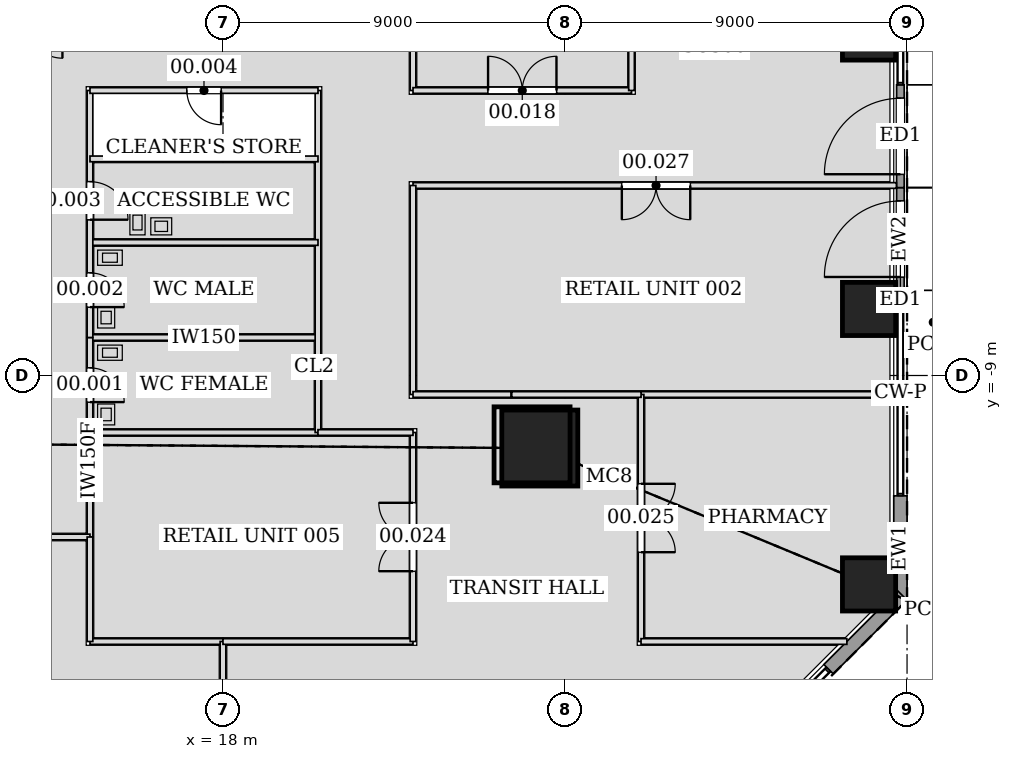
"""IFC4 building model, lengths in metres.
Left out: names, types, materials, properties, quantities, classifications, styles, units other than length and angle.
Written with IfcOpenShell. Run it as: python <this file> out.ifc"""

import sys

from ifc_helpers import new_model, si_unit, direction, frame, frame_2d, origin, origin_2d, place, context, subcontext, project, spatial, rectangle, hollow_rectangle, extrude, element, fill, save


model = new_model("IFC4")
c1 = context("Model", 3, precision=1e-05, world=origin(), true_north=direction((0.0, 1.0)))
c2 = subcontext(c1, "Body", "Model", "MODEL_VIEW")
j1 = project(units=[si_unit("LENGTHUNIT", "METRE"), si_unit("PLANEANGLEUNIT", "RADIAN")], contexts=[c1])
p1 = place(None, origin())
s1 = spatial("IfcSite", under=j1, at=p1, CompositionType="ELEMENT")
p2 = place(p1, origin())
s2 = spatial("IfcBuilding", under=s1, at=p2, CompositionType="ELEMENT")
p3 = place(p2, origin())
s3 = spatial("IfcBuildingStorey", under=s2, at=p3, CompositionType="ELEMENT", Elevation=0.0)
p4 = place(p3, frame((26.336, -10.909, 0.0), z_axis=(-0.028266568786, 0.011726897842, 0.999531630793), x_axis=(-0.383199413132, -0.923665637433, 0.0)))
e1 = element("IfcColumn", 1, at=p4, inside=s3, PredefinedType="COLUMN", context=c2, shape_type="SweptSolid", body=[
    extrude(hollow_rectangle(XDim=2.0, YDim=2.0, WallThickness=0.09, at=origin_2d()), origin(), (0.0, 0.0, 1.0), 7.203),
])
for number, where, z_axis, x_axis in (
    (2, (35.0, -14.498, 0.0), (0.0, 0.0, 1.0), (1.0, 0.0, 0.0)),
    (3, (35.0, -7.249, 0.0), (0.0, 0.0, 1.0), (1.0, 0.0, 0.0)),
    (4, (35.0, 0.0, 0.0), (0.0, 0.0, 1.0), (1.0, 0.0, 0.0)),
):
    element("IfcColumn", number, at=place(p3, frame(where, z_axis=z_axis, x_axis=x_axis)), inside=s3, PredefinedType="COLUMN", context=c2, shape_type="SweptSolid", body=[
        extrude(rectangle(XDim=1.4, YDim=1.4, at=origin_2d()), origin(), (0.0, 0.0, 1.0), 7.2),
    ])
p5 = place(p3, frame((35.825, -14.912, 0.0), z_axis=(0.0, 0.0, 1.0), x_axis=(0.0, 1.0, 0.0)))
e5 = element("IfcWall", 5, at=p5, inside=s3, PredefinedType="SOLIDWALL", context=c2, shape_type="SweptSolid", body=[
    extrude(rectangle(XDim=2.745, YDim=0.35, at=frame_2d((1.373, 0.0))), origin(), (0.0, 0.0, 1.0), 6.9),
])
p6 = place(p3, frame((35.825, -6.759, 0.0), z_axis=(0.0, 0.0, 1.0), x_axis=(0.0, 1.0, 0.0)))
e6 = element("IfcWall", 6, at=p6, inside=s3, PredefinedType="SOLIDWALL", context=c2, shape_type="SweptSolid", body=[
    extrude(rectangle(XDim=2.704, YDim=0.2, at=frame_2d((1.352, 0.0))), origin(), (0.0, 0.0, 1.0), 6.9),
])
p7 = place(p6, frame((0.352, 0.0, 0.0)))
e7 = element("IfcOpeningElement", 7, at=p7, cuts=e6, PredefinedType="OPENING", context=c2, shape_type="SweptSolid", body=[
    extrude(rectangle(XDim=2.0, YDim=3.0, at=frame_2d((1.0, 1.5))), frame((0.0, 0.11, 0.0), z_axis=(0.0, -1.0, 0.0), x_axis=(1.0, 0.0, 0.0)), (0.0, 0.0, 1.0), 0.22),
])
p8 = place(p3, frame((35.825, -4.055, 0.0), z_axis=(0.0, 0.0, 1.0), x_axis=(0.0, 1.0, 0.0)))
e8 = element("IfcWall", 8, at=p8, inside=s3, PredefinedType="SOLIDWALL", context=c2, shape_type="SweptSolid", body=[
    extrude(rectangle(XDim=2.704, YDim=0.2, at=frame_2d((1.352, 0.0))), origin(), (0.0, 0.0, 1.0), 6.9),
])
p9 = place(p8, frame((0.352, 0.0, 0.0)))
e9 = element("IfcOpeningElement", 9, at=p9, cuts=e8, PredefinedType="OPENING", context=c2, shape_type="SweptSolid", body=[
    extrude(rectangle(XDim=2.0, YDim=3.0, at=frame_2d((1.0, 1.5))), frame((0.0, 0.11, 0.0), z_axis=(0.0, -1.0, 0.0), x_axis=(1.0, 0.0, 0.0)), (0.0, 0.0, 1.0), 0.22),
])
p10 = place(p3, frame((33.935, -16.729, 0.0), z_axis=(0.0, 0.0, 1.0), x_axis=(0.707106781187, 0.707106781187, 0.0)))
e10 = element("IfcWall", 10, at=p10, inside=s3, PredefinedType="SOLIDWALL", context=c2, shape_type="SweptSolid", body=[
    extrude(rectangle(XDim=2.745, YDim=0.35, at=frame_2d((1.373, 0.0))), origin(), (0.0, 0.0, 1.0), 6.9),
])
p11 = place(p3, frame((20.5, -8.0, 0.0), z_axis=(0.0, 0.0, 1.0), x_axis=(-1.0, 0.0, 0.0)))
e11 = element("IfcWall", 11, at=p11, inside=s3, PredefinedType="PARTITIONING", context=c2, shape_type="SweptSolid", body=[
    extrude(rectangle(XDim=6.0, YDim=0.15, at=frame_2d((3.0, 0.0))), origin(), (0.0, 0.0, 1.0), 6.283),
])
p12 = place(p3, frame((14.5, -10.5, 0.0), z_axis=(0.0, 0.0, 1.0), x_axis=(1.0, 0.0, 0.0)))
e12 = element("IfcWall", 12, at=p12, inside=s3, PredefinedType="PARTITIONING", context=c2, shape_type="SweptSolid", body=[
    extrude(rectangle(XDim=6.0, YDim=0.15, at=frame_2d((3.0, 0.0))), origin(), (0.0, 0.0, 1.0), 5.59),
])
p13 = place(p3, frame((14.5, -8.0, 0.0), z_axis=(0.0, 0.0, 1.0), x_axis=(0.0, -1.0, 0.0)))
e13 = element("IfcWall", 13, at=p13, inside=s3, PredefinedType="PARTITIONING", context=c2, shape_type="SweptSolid", body=[
    extrude(rectangle(XDim=5.251, YDim=0.15, at=frame_2d((2.625, 0.0))), origin(), (0.0, 0.0, 1.0), 5.59),
])
p14 = place(p13, frame((0.8, 0.0, 0.0)))
e14 = element("IfcOpeningElement", 14, at=p14, cuts=e13, PredefinedType="OPENING", context=c2, shape_type="SweptSolid", body=[
    extrude(rectangle(XDim=0.9, YDim=2.1, at=frame_2d((0.45, 1.05))), frame((0.0, 0.085, 0.0), z_axis=(0.0, -1.0, 0.0), x_axis=(1.0, 0.0, 0.0)), (0.0, 0.0, 1.0), 0.17),
])
p15 = place(p3, frame((20.5, -10.5, 0.0), z_axis=(0.0, 0.0, 1.0), x_axis=(0.0, 1.0, 0.0)))
e15 = element("IfcWall", 15, at=p15, inside=s3, PredefinedType="PARTITIONING", context=c2, shape_type="SweptSolid", body=[
    extrude(rectangle(XDim=9.0, YDim=0.15, at=frame_2d((4.5, 0.0))), origin(), (0.0, 0.0, 1.0), 6.9),
])
p16 = place(p3, frame((20.5, -5.5, 0.0), z_axis=(0.0, 0.0, 1.0), x_axis=(-1.0, 0.0, 0.0)))
e16 = element("IfcWall", 16, at=p16, inside=s3, PredefinedType="PARTITIONING", context=c2, shape_type="SweptSolid", body=[
    extrude(rectangle(XDim=6.0, YDim=0.15, at=frame_2d((3.0, 0.0))), origin(), (0.0, 0.0, 1.0), 6.283),
])
p17 = place(p3, frame((14.5, -8.0, 0.0), z_axis=(0.0, 0.0, 1.0), x_axis=(0.0, 1.0, 0.0)))
e17 = element("IfcWall", 17, at=p17, inside=s3, PredefinedType="PARTITIONING", context=c2, shape_type="SweptSolid", body=[
    extrude(rectangle(XDim=6.5, YDim=0.15, at=frame_2d((3.25, 0.0))), origin(), (0.0, 0.0, 1.0), 6.9),
])
p18 = place(p17, frame((0.8, 0.0, 0.0)))
e18 = element("IfcOpeningElement", 18, at=p18, cuts=e17, PredefinedType="OPENING", context=c2, shape_type="SweptSolid", body=[
    extrude(rectangle(XDim=0.9, YDim=2.1, at=frame_2d((0.45, 1.05))), frame((0.0, 0.085, 0.0), z_axis=(0.0, -1.0, 0.0), x_axis=(1.0, 0.0, 0.0)), (0.0, 0.0, 1.0), 0.17),
])
p19 = place(p17, frame((3.1, 0.0, 0.0)))
e19 = element("IfcOpeningElement", 19, at=p19, cuts=e17, PredefinedType="OPENING", context=c2, shape_type="SweptSolid", body=[
    extrude(rectangle(XDim=1.0, YDim=2.1, at=frame_2d((0.5, 1.05))), frame((0.0, 0.085, 0.0), z_axis=(0.0, -1.0, 0.0), x_axis=(1.0, 0.0, 0.0)), (0.0, 0.0, 1.0), 0.17),
])
p20 = place(p3, frame((20.5, -3.3, 0.0), z_axis=(0.0, 0.0, 1.0), x_axis=(-1.0, 0.0, 0.0)))
e20 = element("IfcWall", 20, at=p20, inside=s3, PredefinedType="PARTITIONING", context=c2, shape_type="SweptSolid", body=[
    extrude(rectangle(XDim=6.0, YDim=0.15, at=frame_2d((3.0, 0.0))), origin(), (0.0, 0.0, 1.0), 6.283),
])
p21 = place(p3, frame((20.5, -1.5, 0.0), z_axis=(0.0, 0.0, 1.0), x_axis=(-1.0, 0.0, 0.0)))
e21 = element("IfcWall", 21, at=p21, inside=s3, PredefinedType="PARTITIONING", context=c2, shape_type="SweptSolid", body=[
    extrude(rectangle(XDim=6.0, YDim=0.15, at=frame_2d((3.0, 0.0))), origin(), (0.0, 0.0, 1.0), 6.283),
])
p22 = place(p21, frame((2.55, 0.0, 0.0)))
e22 = element("IfcOpeningElement", 22, at=p22, cuts=e21, PredefinedType="OPENING", context=c2, shape_type="SweptSolid", body=[
    extrude(rectangle(XDim=0.9, YDim=2.1, at=frame_2d((0.45, 1.05))), frame((0.0, 0.085, 0.0), z_axis=(0.0, -1.0, 0.0), x_axis=(1.0, 0.0, 0.0)), (0.0, 0.0, 1.0), 0.17),
])
p23 = place(p3, frame((23.0, 0.25, 0.0), z_axis=(0.0, 0.0, 1.0), x_axis=(0.0, -1.0, 0.0)))
e23 = element("IfcWall", 23, at=p23, inside=s3, PredefinedType="PARTITIONING", context=c2, shape_type="SweptSolid", body=[
    extrude(rectangle(XDim=1.75, YDim=0.15, at=frame_2d((0.875, 0.0))), origin(), (0.0, 0.0, 1.0), 5.59),
])
p24 = place(p3, frame((23.0, -1.5, 0.0), z_axis=(0.0, 0.0, 1.0), x_axis=(1.0, 0.0, 0.0)))
e24 = element("IfcWall", 24, at=p24, inside=s3, PredefinedType="PARTITIONING", context=c2, shape_type="SweptSolid", body=[
    extrude(rectangle(XDim=5.75, YDim=0.15, at=frame_2d((2.875, 0.0))), origin(), (0.0, 0.0, 1.0), 5.879),
])
p25 = place(p24, frame((1.975, 0.0, 0.0)))
e25 = element("IfcOpeningElement", 25, at=p25, cuts=e24, PredefinedType="OPENING", context=c2, shape_type="SweptSolid", body=[
    extrude(rectangle(XDim=1.8, YDim=2.4, at=frame_2d((0.9, 1.2))), frame((0.0, 0.085, 0.0), z_axis=(0.0, -1.0, 0.0), x_axis=(1.0, 0.0, 0.0)), (0.0, 0.0, 1.0), 0.17),
])
p26 = place(p3, frame((28.75, -1.5, 0.0), z_axis=(0.0, 0.0, 1.0), x_axis=(0.0, 1.0, 0.0)))
e26 = element("IfcWall", 26, at=p26, inside=s3, PredefinedType="PARTITIONING", context=c2, shape_type="SweptSolid", body=[
    extrude(rectangle(XDim=1.601, YDim=0.15, at=frame_2d((0.8, 0.0))), origin(), (0.0, 0.0, 1.0), 6.9),
])
p27 = place(p3, frame((0.25, -13.25, 0.0), z_axis=(0.0, 0.0, 1.0), x_axis=(1.0, 0.0, 0.0)))
e27 = element("IfcWall", 27, at=p27, inside=s3, PredefinedType="PARTITIONING", context=c2, shape_type="SweptSolid", body=[
    extrude(rectangle(XDim=14.25, YDim=0.15, at=frame_2d((7.125, 0.0))), origin(), (0.0, 0.0, 1.0), 5.59),
])
p28 = place(p27, frame((3.45, 0.0, 0.0)))
e28 = element("IfcOpeningElement", 28, at=p28, cuts=e27, PredefinedType="OPENING", context=c2, shape_type="SweptSolid", body=[
    extrude(rectangle(XDim=1.8, YDim=2.4, at=frame_2d((0.9, 1.2))), frame((0.0, 0.085, 0.0), z_axis=(0.0, -1.0, 0.0), x_axis=(1.0, 0.0, 0.0)), (0.0, 0.0, 1.0), 0.17),
])
p29 = place(p3, frame((18.0, -16.0, 0.0), z_axis=(0.0, 0.0, 1.0), x_axis=(-1.0, 0.0, 0.0)))
e29 = element("IfcWall", 29, at=p29, inside=s3, PredefinedType="PARTITIONING", context=c2, shape_type="SweptSolid", body=[
    extrude(rectangle(XDim=3.5, YDim=0.15, at=frame_2d((1.75, 0.0))), origin(), (0.0, 0.0, 1.0), 5.79),
])
p30 = place(p3, frame((14.5, -16.0, 0.0), z_axis=(0.0, 0.0, 1.0), x_axis=(0.0, 1.0, 0.0)))
e30 = element("IfcWall", 30, at=p30, inside=s3, PredefinedType="PARTITIONING", context=c2, shape_type="SweptSolid", body=[
    extrude(rectangle(XDim=2.75, YDim=0.15, at=frame_2d((1.375, 0.0))), origin(), (0.0, 0.0, 1.0), 5.79),
])
p31 = place(p3, frame((18.0, -24.0, 0.0), z_axis=(0.0, 0.0, 1.0), x_axis=(0.0, 1.0, 0.0)))
e31 = element("IfcWall", 31, at=p31, inside=s3, PredefinedType="PARTITIONING", context=c2, shape_type="SweptSolid", body=[
    extrude(rectangle(XDim=8.0, YDim=0.15, at=frame_2d((4.0, 0.0))), origin(), (0.0, 0.0, 1.0), 5.79),
])
p32 = place(p31, frame((3.1, 0.0, 0.0)))
e32 = element("IfcOpeningElement", 32, at=p32, cuts=e31, PredefinedType="OPENING", context=c2, shape_type="SweptSolid", body=[
    extrude(rectangle(XDim=1.8, YDim=2.4, at=frame_2d((0.9, 1.2))), frame((0.0, 0.085, 0.0), z_axis=(0.0, -1.0, 0.0), x_axis=(1.0, 0.0, 0.0)), (0.0, 0.0, 1.0), 0.17),
])
p33 = place(p3, frame((17.999, -16.0, 0.0), z_axis=(0.0, 0.0, 1.0), x_axis=(1.0, 0.0, 0.0)))
e33 = element("IfcWall", 33, at=p33, inside=s3, PredefinedType="PARTITIONING", context=c2, shape_type="SweptSolid", body=[
    extrude(rectangle(XDim=5.001, YDim=0.15, at=frame_2d((2.5, 0.0))), origin(), (0.0, 0.0, 1.0), 6.049),
])
p34 = place(p3, frame((23.0, -16.0, 0.0), z_axis=(0.0, 0.0, 1.0), x_axis=(0.0, 1.0, 0.0)))
e34 = element("IfcWall", 34, at=p34, inside=s3, PredefinedType="PARTITIONING", context=c2, shape_type="SweptSolid", body=[
    extrude(rectangle(XDim=5.5, YDim=0.15, at=frame_2d((2.75, 0.0))), origin(), (0.0, 0.0, 1.0), 5.59),
])
p35 = place(p34, frame((1.85, 0.0, 0.0)))
e35 = element("IfcOpeningElement", 35, at=p35, cuts=e34, PredefinedType="OPENING", context=c2, shape_type="SweptSolid", body=[
    extrude(rectangle(XDim=1.8, YDim=2.4, at=frame_2d((0.9, 1.2))), frame((0.0, 0.085, 0.0), z_axis=(0.0, -1.0, 0.0), x_axis=(1.0, 0.0, 0.0)), (0.0, 0.0, 1.0), 0.17),
])
p36 = place(p3, frame((23.0, -10.5, 0.0), z_axis=(0.0, 0.0, 1.0), x_axis=(-1.0, 0.0, 0.0)))
e36 = element("IfcWall", 36, at=p36, inside=s3, PredefinedType="PARTITIONING", context=c2, shape_type="SweptSolid", body=[
    extrude(rectangle(XDim=2.501, YDim=0.15, at=frame_2d((1.25, 0.0))), origin(), (0.0, 0.0, 1.0), 5.59),
])
p37 = place(p3, frame((35.807, -9.5, 0.0), z_axis=(0.0, 0.0, 1.0), x_axis=(-1.0, 0.0, 0.0)))
e37 = element("IfcWall", 37, at=p37, inside=s3, PredefinedType="PARTITIONING", context=c2, shape_type="SweptSolid", body=[
    extrude(rectangle(XDim=6.807, YDim=0.15, at=frame_2d((3.403, 0.0))), origin(), (0.0, 0.0, 1.0), 6.288),
])
p38 = place(p3, frame((29.0, -9.5, 0.0), z_axis=(0.0, 0.0, 1.0), x_axis=(0.0, -1.0, 0.0)))
e38 = element("IfcWall", 38, at=p38, inside=s3, PredefinedType="PARTITIONING", context=c2, shape_type="SweptSolid", body=[
    extrude(rectangle(XDim=6.5, YDim=0.15, at=frame_2d((3.25, 0.0))), origin(), (0.0, 0.0, 1.0), 5.907),
])
p39 = place(p38, frame((2.35, 0.0, 0.0)))
e39 = element("IfcOpeningElement", 39, at=p39, cuts=e38, PredefinedType="OPENING", context=c2, shape_type="SweptSolid", body=[
    extrude(rectangle(XDim=1.8, YDim=2.4, at=frame_2d((0.9, 1.2))), frame((0.0, 0.085, 0.0), z_axis=(0.0, -1.0, 0.0), x_axis=(1.0, 0.0, 0.0)), (0.0, 0.0, 1.0), 0.17),
])
p40 = place(p3, frame((29.0, -16.0, 0.0), z_axis=(0.0, 0.0, 1.0), x_axis=(1.0, 0.0, 0.0)))
e40 = element("IfcWall", 40, at=p40, inside=s3, PredefinedType="PARTITIONING", context=c2, shape_type="SweptSolid", body=[
    extrude(rectangle(XDim=5.417, YDim=0.15, at=frame_2d((2.708, 0.0))), origin(), (0.0, 0.0, 1.0), 6.291),
])
p41 = place(p3, frame((35.72, -4.0, 0.0), z_axis=(0.0, 0.0, 1.0), x_axis=(-1.0, 0.0, 0.0)))
e41 = element("IfcWall", 41, at=p41, inside=s3, PredefinedType="PARTITIONING", context=c2, shape_type="SweptSolid", body=[
    extrude(rectangle(XDim=12.72, YDim=0.15, at=frame_2d((6.36, 0.0))), origin(), (0.0, 0.0, 1.0), 5.879),
])
p42 = place(p41, frame((5.425, 0.0, 0.0)))
e42 = element("IfcOpeningElement", 42, at=p42, cuts=e41, PredefinedType="OPENING", context=c2, shape_type="SweptSolid", body=[
    extrude(rectangle(XDim=1.8, YDim=2.4, at=frame_2d((0.9, 1.2))), frame((0.0, 0.085, 0.0), z_axis=(0.0, -1.0, 0.0), x_axis=(1.0, 0.0, 0.0)), (0.0, 0.0, 1.0), 0.17),
])
p43 = place(p3, frame((23.0, -4.0, 0.0), z_axis=(0.0, 0.0, 1.0), x_axis=(0.0, -1.0, 0.0)))
e43 = element("IfcWall", 43, at=p43, inside=s3, PredefinedType="PARTITIONING", context=c2, shape_type="SweptSolid", body=[
    extrude(rectangle(XDim=5.5, YDim=0.15, at=frame_2d((2.75, 0.0))), origin(), (0.0, 0.0, 1.0), 6.9),
])
p44 = place(p3, frame((23.0, -9.5, 0.0), z_axis=(0.0, 0.0, 1.0), x_axis=(1.0, 0.0, 0.0)))
e44 = element("IfcWall", 44, at=p44, inside=s3, PredefinedType="PARTITIONING", context=c2, shape_type="SweptSolid", body=[
    extrude(rectangle(XDim=2.578, YDim=0.15, at=frame_2d((1.289, 0.0))), origin(), (0.0, 0.0, 1.0), 5.963),
])
p45 = place(p3, frame((25.598, -9.5, 0.0), z_axis=(0.0, 0.0, 1.0), x_axis=(1.0, 0.0, 0.0)))
e45 = element("IfcWall", 45, at=p45, inside=s3, PredefinedType="PARTITIONING", context=c2, shape_type="SweptSolid", body=[
    extrude(rectangle(XDim=3.403, YDim=0.15, at=frame_2d((1.702, 0.0))), origin(), (0.0, 0.0, 1.0), 5.879),
])
p46 = place(p7, origin())
e46 = element("IfcDoor", 46, at=p46, inside=s3, OperationType="SINGLE_SWING_LEFT", PredefinedType="DOOR", context=c2, shape_type="SweptSolid", body=[
    extrude(rectangle(XDim=2.0, YDim=3.0, at=frame_2d((1.0, 1.5))), frame((0.0, 0.025, 0.0), z_axis=(0.0, -1.0, 0.0), x_axis=(1.0, 0.0, 0.0)), (0.0, 0.0, 1.0), 0.05),
])
fill(e7, e46)
p47 = place(p9, origin())
e47 = element("IfcDoor", 47, at=p47, inside=s3, OperationType="SINGLE_SWING_LEFT", PredefinedType="DOOR", context=c2, shape_type="SweptSolid", body=[
    extrude(rectangle(XDim=2.0, YDim=3.0, at=frame_2d((1.0, 1.5))), frame((0.0, 0.025, 0.0), z_axis=(0.0, -1.0, 0.0), x_axis=(1.0, 0.0, 0.0)), (0.0, 0.0, 1.0), 0.05),
])
fill(e9, e47)
p48 = place(p14, origin())
e48 = element("IfcDoor", 48, at=p48, inside=s3, OperationType="SINGLE_SWING_RIGHT", PredefinedType="DOOR", context=c2, shape_type="SweptSolid", body=[
    extrude(rectangle(XDim=0.9, YDim=2.1, at=frame_2d((0.45, 1.05))), frame((0.0, 0.025, 0.0), z_axis=(0.0, -1.0, 0.0), x_axis=(1.0, 0.0, 0.0)), (0.0, 0.0, 1.0), 0.05),
])
fill(e14, e48)
p49 = place(p18, frame((0.9, 0.0, 0.0), z_axis=(0.0, 0.0, 1.0), x_axis=(-1.0, 0.0, 0.0)))
e49 = element("IfcDoor", 49, at=p49, inside=s3, OperationType="SINGLE_SWING_RIGHT", PredefinedType="DOOR", context=c2, shape_type="SweptSolid", body=[
    extrude(rectangle(XDim=0.9, YDim=2.1, at=frame_2d((0.45, 1.05))), frame((0.0, 0.025, 0.0), z_axis=(0.0, -1.0, 0.0), x_axis=(1.0, 0.0, 0.0)), (0.0, 0.0, 1.0), 0.05),
])
fill(e18, e49)
p50 = place(p19, frame((1.0, 0.0, 0.0), z_axis=(0.0, 0.0, 1.0), x_axis=(-1.0, 0.0, 0.0)))
e50 = element("IfcDoor", 50, at=p50, inside=s3, OperationType="SINGLE_SWING_RIGHT", PredefinedType="DOOR", context=c2, shape_type="SweptSolid", body=[
    extrude(rectangle(XDim=1.0, YDim=2.1, at=frame_2d((0.5, 1.05))), frame((0.0, 0.025, 0.0), z_axis=(0.0, -1.0, 0.0), x_axis=(1.0, 0.0, 0.0)), (0.0, 0.0, 1.0), 0.05),
])
fill(e19, e50)
p51 = place(p22, origin())
e51 = element("IfcDoor", 51, at=p51, inside=s3, OperationType="SINGLE_SWING_LEFT", PredefinedType="DOOR", context=c2, shape_type="SweptSolid", body=[
    extrude(rectangle(XDim=0.9, YDim=2.1, at=frame_2d((0.45, 1.05))), frame((0.0, 0.025, 0.0), z_axis=(0.0, -1.0, 0.0), x_axis=(1.0, 0.0, 0.0)), (0.0, 0.0, 1.0), 0.05),
])
fill(e22, e51)
p52 = place(p25, origin())
e52 = element("IfcDoor", 52, at=p52, inside=s3, OperationType="DOUBLE_DOOR_SINGLE_SWING", PredefinedType="DOOR", context=c2, shape_type="SweptSolid", body=[
    extrude(rectangle(XDim=1.8, YDim=2.4, at=frame_2d((0.9, 1.2))), frame((0.0, 0.025, 0.0), z_axis=(0.0, -1.0, 0.0), x_axis=(1.0, 0.0, 0.0)), (0.0, 0.0, 1.0), 0.05),
])
fill(e25, e52)
p53 = place(p35, origin())
e53 = element("IfcDoor", 53, at=p53, inside=s3, OperationType="DOUBLE_DOOR_SINGLE_SWING", PredefinedType="DOOR", context=c2, shape_type="SweptSolid", body=[
    extrude(rectangle(XDim=1.8, YDim=2.4, at=frame_2d((0.9, 1.2))), frame((0.0, 0.025, 0.0), z_axis=(0.0, -1.0, 0.0), x_axis=(1.0, 0.0, 0.0)), (0.0, 0.0, 1.0), 0.05),
])
fill(e35, e53)
p54 = place(p39, origin())
e54 = element("IfcDoor", 54, at=p54, inside=s3, OperationType="DOUBLE_DOOR_SINGLE_SWING", PredefinedType="DOOR", context=c2, shape_type="SweptSolid", body=[
    extrude(rectangle(XDim=1.8, YDim=2.4, at=frame_2d((0.9, 1.2))), frame((0.0, 0.025, 0.0), z_axis=(0.0, -1.0, 0.0), x_axis=(1.0, 0.0, 0.0)), (0.0, 0.0, 1.0), 0.05),
])
fill(e39, e54)
p55 = place(p42, origin())
e55 = element("IfcDoor", 55, at=p55, inside=s3, OperationType="DOUBLE_DOOR_SINGLE_SWING", PredefinedType="DOOR", context=c2, shape_type="SweptSolid", body=[
    extrude(rectangle(XDim=1.8, YDim=2.4, at=frame_2d((0.9, 1.2))), frame((0.0, 0.025, 0.0), z_axis=(0.0, -1.0, 0.0), x_axis=(1.0, 0.0, 0.0)), (0.0, 0.0, 1.0), 0.05),
])
fill(e42, e55)
save(model, sys.argv[1])
